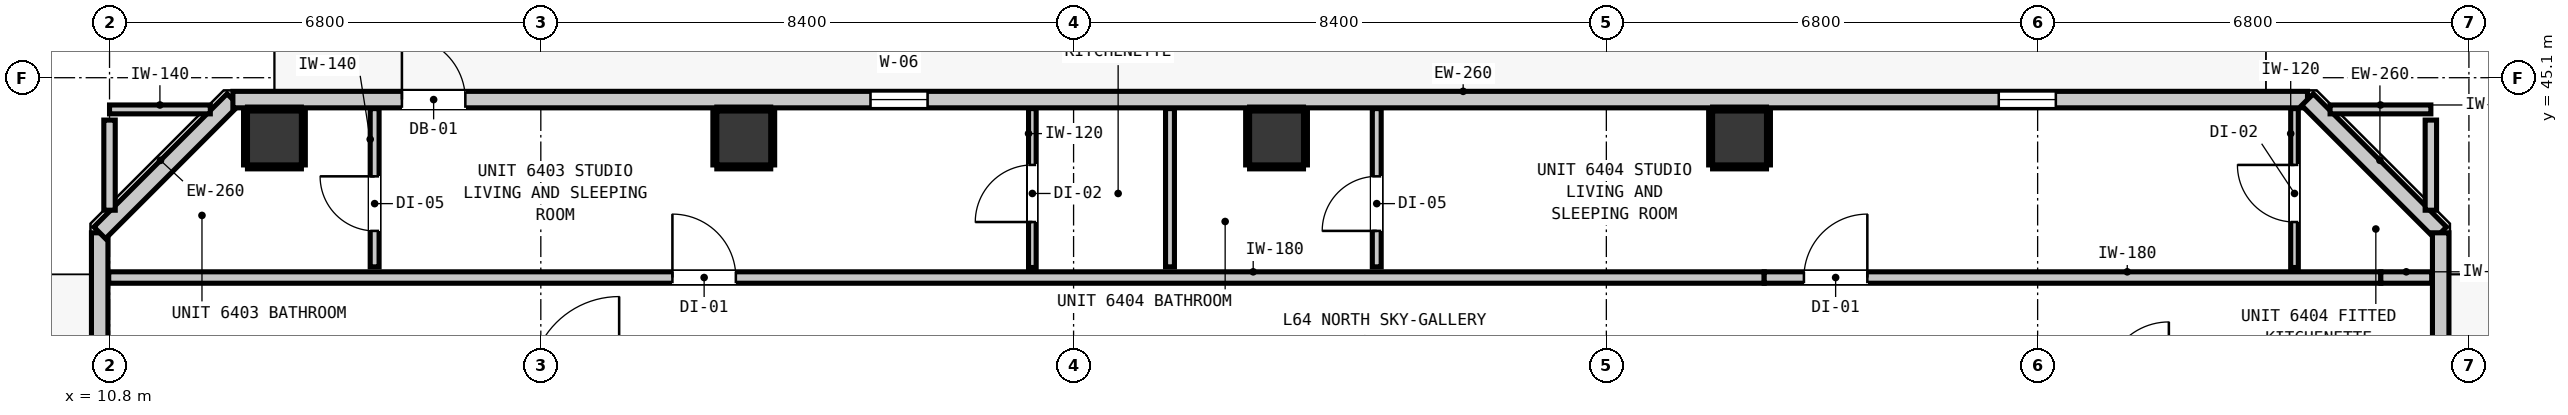
"""IFC4 building model, lengths in metres.
Left out: names, types, materials, properties, quantities, classifications, styles, units other than length and angle.
Written with IfcOpenShell. Run it as: python <this file> out.ifc"""

import sys

from ifc_helpers import new_model, si_unit, direction, frame, frame_2d, origin, origin_2d, place, context, subcontext, project, spatial, rectangle, extrude, element, fill, save


model = new_model("IFC4")
c1 = context("Model", 3, precision=1e-05, world=origin(), true_north=direction((0.0, 1.0)))
c2 = subcontext(c1, "Body", "Model", "MODEL_VIEW")
j1 = project(units=[si_unit("LENGTHUNIT", "METRE"), si_unit("PLANEANGLEUNIT", "RADIAN")], contexts=[c1])
p1 = place(None, origin())
s1 = spatial("IfcSite", under=j1, at=p1, CompositionType="ELEMENT")
p2 = place(p1, origin())
s2 = spatial("IfcBuilding", under=s1, at=p2, CompositionType="ELEMENT")
p3 = place(p2, frame((0.0, 0.0, 220.04)))
s3 = spatial("IfcBuildingStorey", under=s2, at=p3, CompositionType="ELEMENT", Elevation=220.04)
for number, where, z_axis, x_axis in (
    (1, (13.4, 44.15, 0.0), (0.0, 0.0, 1.0), (1.0, 0.0, 0.0)),
    (2, (20.8, 44.15, 0.0), (0.0, 0.0, 1.0), (1.0, 0.0, 0.0)),
    (3, (29.2, 44.15, 0.0), (0.0, 0.0, 1.0), (1.0, 0.0, 0.0)),
    (4, (36.5, 44.15, 0.0), (0.0, 0.0, 1.0), (1.0, 0.0, 0.0)),
):
    element("IfcColumn", number, at=place(p3, frame(where, z_axis=z_axis, x_axis=x_axis)), inside=s3, PredefinedType="COLUMN", context=c2, shape_type="SweptSolid", body=[
        extrude(rectangle(XDim=0.85, YDim=0.85, at=origin_2d()), origin(), (0.0, 0.0, 1.0), 3.32),
    ])
p4 = place(p3, frame((10.645, 12.345, 0.0), z_axis=(0.0, 0.0, 1.0), x_axis=(0.0, 1.0, 0.0)))
e5 = element("IfcWall", 5, at=p4, inside=s3, PredefinedType="STANDARD", context=c2, shape_type="SweptSolid", body=[
    extrude(rectangle(XDim=30.31, YDim=0.26, at=frame_2d((15.155, 0.0))), origin(), (0.0, 0.0, 1.0), 3.1),
])
p5 = place(p4, frame((0.91, 0.0, 0.0)))
e6 = element("IfcOpeningElement", 6, at=p5, cuts=e5, PredefinedType="OPENING", context=c2, shape_type="SweptSolid", body=[
    extrude(rectangle(XDim=1.0, YDim=2.15, at=frame_2d((0.5, 1.075))), frame((0.0, 0.14, 0.0), z_axis=(0.0, -1.0, 0.0), x_axis=(1.0, 0.0, 0.0)), (0.0, 0.0, 1.0), 0.28),
])
p6 = place(p4, frame((2.322, 0.0, 0.85)))
e7 = element("IfcOpeningElement", 7, at=p6, cuts=e5, PredefinedType="OPENING", context=c2, shape_type="SweptSolid", body=[
    extrude(rectangle(XDim=0.58, YDim=1.5, at=frame_2d((0.29, 0.75))), frame((0.0, 0.14, 0.0), z_axis=(0.0, -1.0, 0.0), x_axis=(1.0, 0.0, 0.0)), (0.0, 0.0, 1.0), 0.28),
])
p7 = place(p3, frame((10.645, 42.655, 0.0), z_axis=(0.0, 0.0, 1.0), x_axis=(0.707147883682, 0.707065676302, 0.0)))
e8 = element("IfcWall", 8, at=p7, inside=s3, PredefinedType="STANDARD", context=c2, shape_type="SweptSolid", body=[
    extrude(rectangle(XDim=2.97, YDim=0.26, at=frame_2d((1.485, 0.0))), origin(), (0.0, 0.0, 1.0), 3.1),
])
p8 = place(p3, frame((12.745, 44.755, 0.0), z_axis=(0.0, 0.0, 1.0), x_axis=(1.0, 0.0, 0.0)))
e9 = element("IfcWall", 9, at=p8, inside=s3, PredefinedType="STANDARD", context=c2, shape_type="SweptSolid", body=[
    extrude(rectangle(XDim=32.71, YDim=0.26, at=frame_2d((16.355, 0.0))), origin(), (0.0, 0.0, 1.0), 3.1),
])
p9 = place(p8, frame((2.665, 0.0, 0.0)))
e10 = element("IfcOpeningElement", 10, at=p9, cuts=e9, PredefinedType="OPENING", context=c2, shape_type="SweptSolid", body=[
    extrude(rectangle(XDim=1.0, YDim=2.15, at=frame_2d((0.5, 1.075))), frame((0.0, 0.14, 0.0), z_axis=(0.0, -1.0, 0.0), x_axis=(1.0, 0.0, 0.0)), (0.0, 0.0, 1.0), 0.28),
])
p10 = place(p8, frame((10.053, 0.0, 0.85)))
e11 = element("IfcOpeningElement", 11, at=p10, cuts=e9, PredefinedType="OPENING", context=c2, shape_type="SweptSolid", body=[
    extrude(rectangle(XDim=0.9, YDim=1.5, at=frame_2d((0.45, 0.75))), frame((0.0, 0.14, 0.0), z_axis=(0.0, -1.0, 0.0), x_axis=(1.0, 0.0, 0.0)), (0.0, 0.0, 1.0), 0.28),
])
p11 = place(p8, frame((27.842, 0.0, 0.85)))
e12 = element("IfcOpeningElement", 12, at=p11, cuts=e9, PredefinedType="OPENING", context=c2, shape_type="SweptSolid", body=[
    extrude(rectangle(XDim=0.9, YDim=1.5, at=frame_2d((0.45, 0.75))), frame((0.0, 0.14, 0.0), z_axis=(0.0, -1.0, 0.0), x_axis=(1.0, 0.0, 0.0)), (0.0, 0.0, 1.0), 0.28),
])
p12 = place(p3, frame((45.455, 44.755, 0.0), z_axis=(0.0, 0.0, 1.0), x_axis=(0.707106781187, -0.707106781187, 0.0)))
e13 = element("IfcWall", 13, at=p12, inside=s3, PredefinedType="STANDARD", context=c2, shape_type="SweptSolid", body=[
    extrude(rectangle(XDim=2.97, YDim=0.26, at=frame_2d((1.485, 0.0))), origin(), (0.0, 0.0, 1.0), 3.1),
])
p13 = place(p3, frame((47.555, 42.655, 0.0), z_axis=(0.0, 0.0, 1.0), x_axis=(0.0, -1.0, 0.0)))
e14 = element("IfcWall", 14, at=p13, inside=s3, PredefinedType="STANDARD", context=c2, shape_type="SweptSolid", body=[
    extrude(rectangle(XDim=30.31, YDim=0.26, at=frame_2d((15.155, 0.0))), origin(), (0.0, 0.0, 1.0), 3.1),
])
p14 = place(p13, frame((4.082, 0.0, 0.0)))
e15 = element("IfcOpeningElement", 15, at=p14, cuts=e14, PredefinedType="OPENING", context=c2, shape_type="SweptSolid", body=[
    extrude(rectangle(XDim=1.0, YDim=2.15, at=frame_2d((0.5, 1.075))), frame((0.0, 0.14, 0.0), z_axis=(0.0, -1.0, 0.0), x_axis=(1.0, 0.0, 0.0)), (0.0, 0.0, 1.0), 0.28),
])
p15 = place(p13, frame((24.701, 0.0, 0.85)))
e16 = element("IfcOpeningElement", 16, at=p15, cuts=e14, PredefinedType="OPENING", context=c2, shape_type="SweptSolid", body=[
    extrude(rectangle(XDim=0.9, YDim=1.5, at=frame_2d((0.45, 0.75))), frame((0.0, 0.14, 0.0), z_axis=(0.0, -1.0, 0.0), x_axis=(1.0, 0.0, 0.0)), (0.0, 0.0, 1.0), 0.28),
])
p16 = place(p13, frame((28.258, 0.0, 0.85)))
e17 = element("IfcOpeningElement", 17, at=p16, cuts=e14, PredefinedType="OPENING", context=c2, shape_type="SweptSolid", body=[
    extrude(rectangle(XDim=0.9, YDim=1.5, at=frame_2d((0.45, 0.75))), frame((0.0, 0.14, 0.0), z_axis=(0.0, -1.0, 0.0), x_axis=(1.0, 0.0, 0.0)), (0.0, 0.0, 1.0), 0.28),
])
p17 = place(p13, frame((15.855, 0.0, 0.85)))
e18 = element("IfcOpeningElement", 18, at=p17, cuts=e14, PredefinedType="OPENING", context=c2, shape_type="SweptSolid", body=[
    extrude(rectangle(XDim=0.9, YDim=1.5, at=frame_2d((0.45, 0.75))), frame((0.0, 0.14, 0.0), z_axis=(0.0, -1.0, 0.0), x_axis=(1.0, 0.0, 0.0)), (0.0, 0.0, 1.0), 0.28),
])
p18 = place(p3, frame((10.787, 41.95, 0.0), z_axis=(0.0, 0.0, 1.0), x_axis=(1.0, 0.0, 0.0)))
e19 = element("IfcWall", 19, at=p18, inside=s3, PredefinedType="PARTITIONING", context=c2, shape_type="SweptSolid", body=[
    extrude(rectangle(XDim=26.102, YDim=0.18, at=frame_2d((13.051, 0.0))), origin(), (0.0, 0.0, 1.0), 3.1),
])
p19 = place(p18, frame((8.888, 0.0, 0.0)))
e20 = element("IfcOpeningElement", 20, at=p19, cuts=e19, PredefinedType="OPENING", context=c2, shape_type="SweptSolid", body=[
    extrude(rectangle(XDim=1.0, YDim=2.15, at=frame_2d((0.5, 1.075))), frame((0.0, 0.1, 0.0), z_axis=(0.0, -1.0, 0.0), x_axis=(1.0, 0.0, 0.0)), (0.0, 0.0, 1.0), 0.2),
])
p20 = place(p3, frame((36.889, 41.95, 0.0), z_axis=(0.0, 0.0, 1.0), x_axis=(1.0, 0.0, 0.0)))
e21 = element("IfcWall", 21, at=p20, inside=s3, PredefinedType="PARTITIONING", context=c2, shape_type="SweptSolid", body=[
    extrude(rectangle(XDim=9.722, YDim=0.18, at=frame_2d((4.861, 0.0))), origin(), (0.0, 0.0, 1.0), 2.477),
])
p21 = place(p20, frame((0.626, 0.0, 0.0)))
e22 = element("IfcOpeningElement", 22, at=p21, cuts=e21, PredefinedType="OPENING", context=c2, shape_type="SweptSolid", body=[
    extrude(rectangle(XDim=1.0, YDim=2.15, at=frame_2d((0.5, 1.075))), frame((0.0, 0.1, 0.0), z_axis=(0.0, -1.0, 0.0), x_axis=(1.0, 0.0, 0.0)), (0.0, 0.0, 1.0), 0.2),
])
p22 = place(p3, frame((46.611, 41.95, 0.0), z_axis=(0.0, 0.0, 1.0), x_axis=(1.0, 0.0, 0.0)))
e23 = element("IfcWall", 23, at=p22, inside=s3, PredefinedType="PARTITIONING", context=c2, shape_type="SweptSolid", body=[
    extrude(rectangle(XDim=0.802, YDim=0.18, at=frame_2d((0.401, 0.0))), origin(), (0.0, 0.0, 1.0), 3.1),
])
for number, where, z_axis, x_axis in (
    (24, (10.8, 44.6, 0.0), (0.0, 0.0, 1.0), (1.0, 0.0, 0.0)),
    (25, (45.811, 44.6, 0.0), (0.0, 0.0, 1.0), (1.0, 0.0, 0.0)),
):
    element("IfcWall", number, at=place(p3, frame(where, z_axis=z_axis, x_axis=x_axis)), inside=s3, PredefinedType="PARTITIONING", context=c2, shape_type="SweptSolid", body=[
        extrude(rectangle(XDim=1.589, YDim=0.14, at=frame_2d((0.794, 0.0))), origin(), (0.0, 0.0, 1.0), 3.1),
    ])
for number, where, z_axis, x_axis in (
    (26, (10.8, 43.011, 0.0), (0.0, 0.0, 1.0), (0.0, 1.0, 0.0)),
    (27, (47.4, 43.011, 0.0), (0.0, 0.0, 1.0), (0.0, 1.0, 0.0)),
):
    element("IfcWall", number, at=place(p3, frame(where, z_axis=z_axis, x_axis=x_axis)), inside=s3, PredefinedType="PARTITIONING", context=c2, shape_type="SweptSolid", body=[
        extrude(rectangle(XDim=1.421, YDim=0.18, at=frame_2d((0.71, 0.0))), origin(), (0.0, 0.0, 1.0), 3.1),
    ])
p23 = place(p3, frame((14.98, 42.118, 0.0), z_axis=(0.0, 0.0, 1.0), x_axis=(0.0, 1.0, 0.0)))
e28 = element("IfcWall", 28, at=p23, inside=s3, PredefinedType="PARTITIONING", context=c2, shape_type="SweptSolid", body=[
    extrude(rectangle(XDim=2.495, YDim=0.14, at=frame_2d((1.248, 0.0))), origin(), (0.0, 0.0, 1.0), 3.1),
])
p24 = place(p23, frame((0.567, 0.0, 0.0)))
e29 = element("IfcOpeningElement", 29, at=p24, cuts=e28, PredefinedType="OPENING", context=c2, shape_type="SweptSolid", body=[
    extrude(rectangle(XDim=0.86, YDim=2.02, at=frame_2d((0.43, 1.01))), frame((0.0, 0.08, 0.0), z_axis=(0.0, -1.0, 0.0), x_axis=(1.0, 0.0, 0.0)), (0.0, 0.0, 1.0), 0.16),
])
p25 = place(p3, frame((27.52, 42.118, 0.0), z_axis=(0.0, 0.0, 1.0), x_axis=(0.0, 1.0, 0.0)))
e30 = element("IfcWall", 30, at=p25, inside=s3, PredefinedType="PARTITIONING", context=c2, shape_type="SweptSolid", body=[
    extrude(rectangle(XDim=2.495, YDim=0.14, at=frame_2d((1.248, 0.0))), origin(), (0.0, 0.0, 1.0), 3.1),
])
p26 = place(p3, frame((30.78, 42.118, 0.0), z_axis=(0.0, 0.0, 1.0), x_axis=(0.0, 1.0, 0.0)))
e31 = element("IfcWall", 31, at=p26, inside=s3, PredefinedType="PARTITIONING", context=c2, shape_type="SweptSolid", body=[
    extrude(rectangle(XDim=2.495, YDim=0.14, at=frame_2d((1.248, 0.0))), origin(), (0.0, 0.0, 1.0), 3.1),
])
p27 = place(p26, frame((0.567, 0.0, 0.0)))
e32 = element("IfcOpeningElement", 32, at=p27, cuts=e31, PredefinedType="OPENING", context=c2, shape_type="SweptSolid", body=[
    extrude(rectangle(XDim=0.86, YDim=2.02, at=frame_2d((0.43, 1.01))), frame((0.0, 0.08, 0.0), z_axis=(0.0, -1.0, 0.0), x_axis=(1.0, 0.0, 0.0)), (0.0, 0.0, 1.0), 0.16),
])
p28 = place(p3, frame((25.35, 42.108, 0.0), z_axis=(0.0, 0.0, 1.0), x_axis=(0.0, 1.0, 0.0)))
e33 = element("IfcWall", 33, at=p28, inside=s3, PredefinedType="PARTITIONING", context=c2, shape_type="SweptSolid", body=[
    extrude(rectangle(XDim=2.505, YDim=0.12, at=frame_2d((1.252, 0.0))), origin(), (0.0, 0.0, 1.0), 3.1),
])
p29 = place(p28, frame((0.717, 0.0, 0.0)))
e34 = element("IfcOpeningElement", 34, at=p29, cuts=e33, PredefinedType="OPENING", context=c2, shape_type="SweptSolid", body=[
    extrude(rectangle(XDim=0.9, YDim=2.1, at=frame_2d((0.45, 1.05))), frame((0.0, 0.07, 0.0), z_axis=(0.0, -1.0, 0.0), x_axis=(1.0, 0.0, 0.0)), (0.0, 0.0, 1.0), 0.14),
])
p30 = place(p3, frame((45.25, 42.108, 0.0), z_axis=(0.0, 0.0, 1.0), x_axis=(0.0, 1.0, 0.0)))
e35 = element("IfcWall", 35, at=p30, inside=s3, PredefinedType="PARTITIONING", context=c2, shape_type="SweptSolid", body=[
    extrude(rectangle(XDim=2.505, YDim=0.12, at=frame_2d((1.252, 0.0))), origin(), (0.0, 0.0, 1.0), 3.1),
])
p31 = place(p30, frame((0.717, 0.0, 0.0)))
e36 = element("IfcOpeningElement", 36, at=p31, cuts=e35, PredefinedType="OPENING", context=c2, shape_type="SweptSolid", body=[
    extrude(rectangle(XDim=0.9, YDim=2.1, at=frame_2d((0.45, 1.05))), frame((0.0, 0.07, 0.0), z_axis=(0.0, -1.0, 0.0), x_axis=(1.0, 0.0, 0.0)), (0.0, 0.0, 1.0), 0.14),
])
for number, where, z_axis, x_axis in (
    (37, (12.975, 43.693, 0.0), (0.0, 0.0, 1.0), (1.0, 0.0, 0.0)),
    (38, (12.975, 44.607, 0.0), (0.0, 0.0, 1.0), (1.0, 0.0, 0.0)),
    (39, (12.943, 43.725, 0.0), (0.0, 0.0, 1.0), (0.0, 1.0, 0.0)),
    (40, (13.857, 43.725, 0.0), (0.0, 0.0, 1.0), (0.0, 1.0, 0.0)),
):
    element("IfcWall", number, at=place(p3, frame(where, z_axis=z_axis, x_axis=x_axis)), inside=s3, PredefinedType="PARTITIONING", context=c2, shape_type="SweptSolid", body=[
        extrude(rectangle(XDim=0.85, YDim=0.06, at=frame_2d((0.425, 0.0))), origin(), (0.0, 0.0, 1.0), 1.45),
    ])
for number, where, z_axis, x_axis in (
    (41, (20.375, 43.693, 0.0), (0.0, 0.0, 1.0), (1.0, 0.0, 0.0)),
    (42, (20.375, 44.607, 0.0), (0.0, 0.0, 1.0), (1.0, 0.0, 0.0)),
):
    element("IfcWall", number, at=place(p3, frame(where, z_axis=z_axis, x_axis=x_axis)), inside=s3, PredefinedType="PARTITIONING", context=c2, shape_type="SweptSolid", body=[
        extrude(rectangle(XDim=0.85, YDim=0.06, at=frame_2d((0.425, 0.0))), origin(), (0.0, 0.0, 1.0), 1.45),
    ])
for number, where, z_axis, x_axis in (
    (43, (20.343, 43.725, 0.0), (0.0, 0.0, 1.0), (0.0, 1.0, 0.0)),
    (44, (21.257, 43.725, 0.0), (0.0, 0.0, 1.0), (0.0, 1.0, 0.0)),
):
    element("IfcWall", number, at=place(p3, frame(where, z_axis=z_axis, x_axis=x_axis)), inside=s3, PredefinedType="PARTITIONING", context=c2, shape_type="SweptSolid", body=[
        extrude(rectangle(XDim=0.85, YDim=0.06, at=frame_2d((0.425, 0.0))), origin(), (0.0, 0.0, 1.0), 1.45),
    ])
for number, where, z_axis, x_axis in (
    (45, (28.775, 43.693, 0.0), (0.0, 0.0, 1.0), (1.0, 0.0, 0.0)),
    (46, (28.775, 44.607, 0.0), (0.0, 0.0, 1.0), (1.0, 0.0, 0.0)),
):
    element("IfcWall", number, at=place(p3, frame(where, z_axis=z_axis, x_axis=x_axis)), inside=s3, PredefinedType="PARTITIONING", context=c2, shape_type="SweptSolid", body=[
        extrude(rectangle(XDim=0.85, YDim=0.06, at=frame_2d((0.425, 0.0))), origin(), (0.0, 0.0, 1.0), 1.45),
    ])
for number, where, z_axis, x_axis in (
    (47, (28.743, 43.725, 0.0), (0.0, 0.0, 1.0), (0.0, 1.0, 0.0)),
    (48, (29.657, 43.725, 0.0), (0.0, 0.0, 1.0), (0.0, 1.0, 0.0)),
):
    element("IfcWall", number, at=place(p3, frame(where, z_axis=z_axis, x_axis=x_axis)), inside=s3, PredefinedType="PARTITIONING", context=c2, shape_type="SweptSolid", body=[
        extrude(rectangle(XDim=0.85, YDim=0.06, at=frame_2d((0.425, 0.0))), origin(), (0.0, 0.0, 1.0), 1.45),
    ])
for number, where, z_axis, x_axis in (
    (49, (36.075, 43.693, 0.0), (0.0, 0.0, 1.0), (1.0, 0.0, 0.0)),
    (50, (36.075, 44.607, 0.0), (0.0, 0.0, 1.0), (1.0, 0.0, 0.0)),
):
    element("IfcWall", number, at=place(p3, frame(where, z_axis=z_axis, x_axis=x_axis)), inside=s3, PredefinedType="PARTITIONING", context=c2, shape_type="SweptSolid", body=[
        extrude(rectangle(XDim=0.85, YDim=0.06, at=frame_2d((0.425, 0.0))), origin(), (0.0, 0.0, 1.0), 1.45),
    ])
for number, where, z_axis, x_axis in (
    (51, (36.043, 43.725, 0.0), (0.0, 0.0, 1.0), (0.0, 1.0, 0.0)),
    (52, (36.957, 43.725, 0.0), (0.0, 0.0, 1.0), (0.0, 1.0, 0.0)),
):
    element("IfcWall", number, at=place(p3, frame(where, z_axis=z_axis, x_axis=x_axis)), inside=s3, PredefinedType="PARTITIONING", context=c2, shape_type="SweptSolid", body=[
        extrude(rectangle(XDim=0.85, YDim=0.06, at=frame_2d((0.425, 0.0))), origin(), (0.0, 0.0, 1.0), 1.45),
    ])
p32 = place(p9, origin())
e53 = element("IfcDoor", 53, at=p32, inside=s3, OperationType="SINGLE_SWING_LEFT", PredefinedType="DOOR", context=c2, shape_type="SweptSolid", body=[
    extrude(rectangle(XDim=1.0, YDim=2.15, at=frame_2d((0.5, 1.075))), frame((0.0, 0.025, 0.0), z_axis=(0.0, -1.0, 0.0), x_axis=(1.0, 0.0, 0.0)), (0.0, 0.0, 1.0), 0.05),
])
fill(e10, e53)
p33 = place(p10, origin())
e54 = element("IfcWindow", 54, at=p33, inside=s3, PartitioningType="SINGLE_PANEL", PredefinedType="WINDOW", context=c2, shape_type="SweptSolid", body=[
    extrude(rectangle(XDim=0.9, YDim=1.5, at=frame_2d((0.45, 0.75))), frame((0.0, 0.03, 0.0), z_axis=(0.0, -1.0, 0.0), x_axis=(1.0, 0.0, 0.0)), (0.0, 0.0, 1.0), 0.06),
])
fill(e11, e54)
p34 = place(p11, origin())
e55 = element("IfcWindow", 55, at=p34, inside=s3, PartitioningType="SINGLE_PANEL", PredefinedType="WINDOW", context=c2, shape_type="SweptSolid", body=[
    extrude(rectangle(XDim=0.9, YDim=1.5, at=frame_2d((0.45, 0.75))), frame((0.0, 0.03, 0.0), z_axis=(0.0, -1.0, 0.0), x_axis=(1.0, 0.0, 0.0)), (0.0, 0.0, 1.0), 0.06),
])
fill(e12, e55)
p35 = place(p19, origin())
e56 = element("IfcDoor", 56, at=p35, inside=s3, OperationType="SINGLE_SWING_LEFT", PredefinedType="DOOR", context=c2, shape_type="SweptSolid", body=[
    extrude(rectangle(XDim=1.0, YDim=2.15, at=frame_2d((0.5, 1.075))), frame((0.0, 0.025, 0.0), z_axis=(0.0, -1.0, 0.0), x_axis=(1.0, 0.0, 0.0)), (0.0, 0.0, 1.0), 0.05),
])
fill(e20, e56)
p36 = place(p24, origin())
e57 = element("IfcDoor", 57, at=p36, inside=s3, OperationType="SINGLE_SWING_RIGHT", PredefinedType="DOOR", context=c2, shape_type="SweptSolid", body=[
    extrude(rectangle(XDim=0.86, YDim=2.02, at=frame_2d((0.43, 1.01))), frame((0.0, 0.025, 0.0), z_axis=(0.0, -1.0, 0.0), x_axis=(1.0, 0.0, 0.0)), (0.0, 0.0, 1.0), 0.05),
])
fill(e29, e57)
p37 = place(p29, origin())
e58 = element("IfcDoor", 58, at=p37, inside=s3, OperationType="SINGLE_SWING_LEFT", PredefinedType="DOOR", context=c2, shape_type="SweptSolid", body=[
    extrude(rectangle(XDim=0.9, YDim=2.1, at=frame_2d((0.45, 1.05))), frame((0.0, 0.025, 0.0), z_axis=(0.0, -1.0, 0.0), x_axis=(1.0, 0.0, 0.0)), (0.0, 0.0, 1.0), 0.05),
])
fill(e34, e58)
p38 = place(p21, origin())
e59 = element("IfcDoor", 59, at=p38, inside=s3, OperationType="SINGLE_SWING_RIGHT", PredefinedType="DOOR", context=c2, shape_type="SweptSolid", body=[
    extrude(rectangle(XDim=1.0, YDim=2.15, at=frame_2d((0.5, 1.075))), frame((0.0, 0.025, 0.0), z_axis=(0.0, -1.0, 0.0), x_axis=(1.0, 0.0, 0.0)), (0.0, 0.0, 1.0), 0.05),
])
fill(e22, e59)
p39 = place(p27, origin())
e60 = element("IfcDoor", 60, at=p39, inside=s3, OperationType="SINGLE_SWING_LEFT", PredefinedType="DOOR", context=c2, shape_type="SweptSolid", body=[
    extrude(rectangle(XDim=0.86, YDim=2.02, at=frame_2d((0.43, 1.01))), frame((0.0, 0.025, 0.0), z_axis=(0.0, -1.0, 0.0), x_axis=(1.0, 0.0, 0.0)), (0.0, 0.0, 1.0), 0.05),
])
fill(e32, e60)
p40 = place(p31, origin())
e61 = element("IfcDoor", 61, at=p40, inside=s3, OperationType="SINGLE_SWING_RIGHT", PredefinedType="DOOR", context=c2, shape_type="SweptSolid", body=[
    extrude(rectangle(XDim=0.9, YDim=2.1, at=frame_2d((0.45, 1.05))), frame((0.0, 0.025, 0.0), z_axis=(0.0, -1.0, 0.0), x_axis=(1.0, 0.0, 0.0)), (0.0, 0.0, 1.0), 0.05),
])
fill(e36, e61)
save(model, sys.argv[1])
